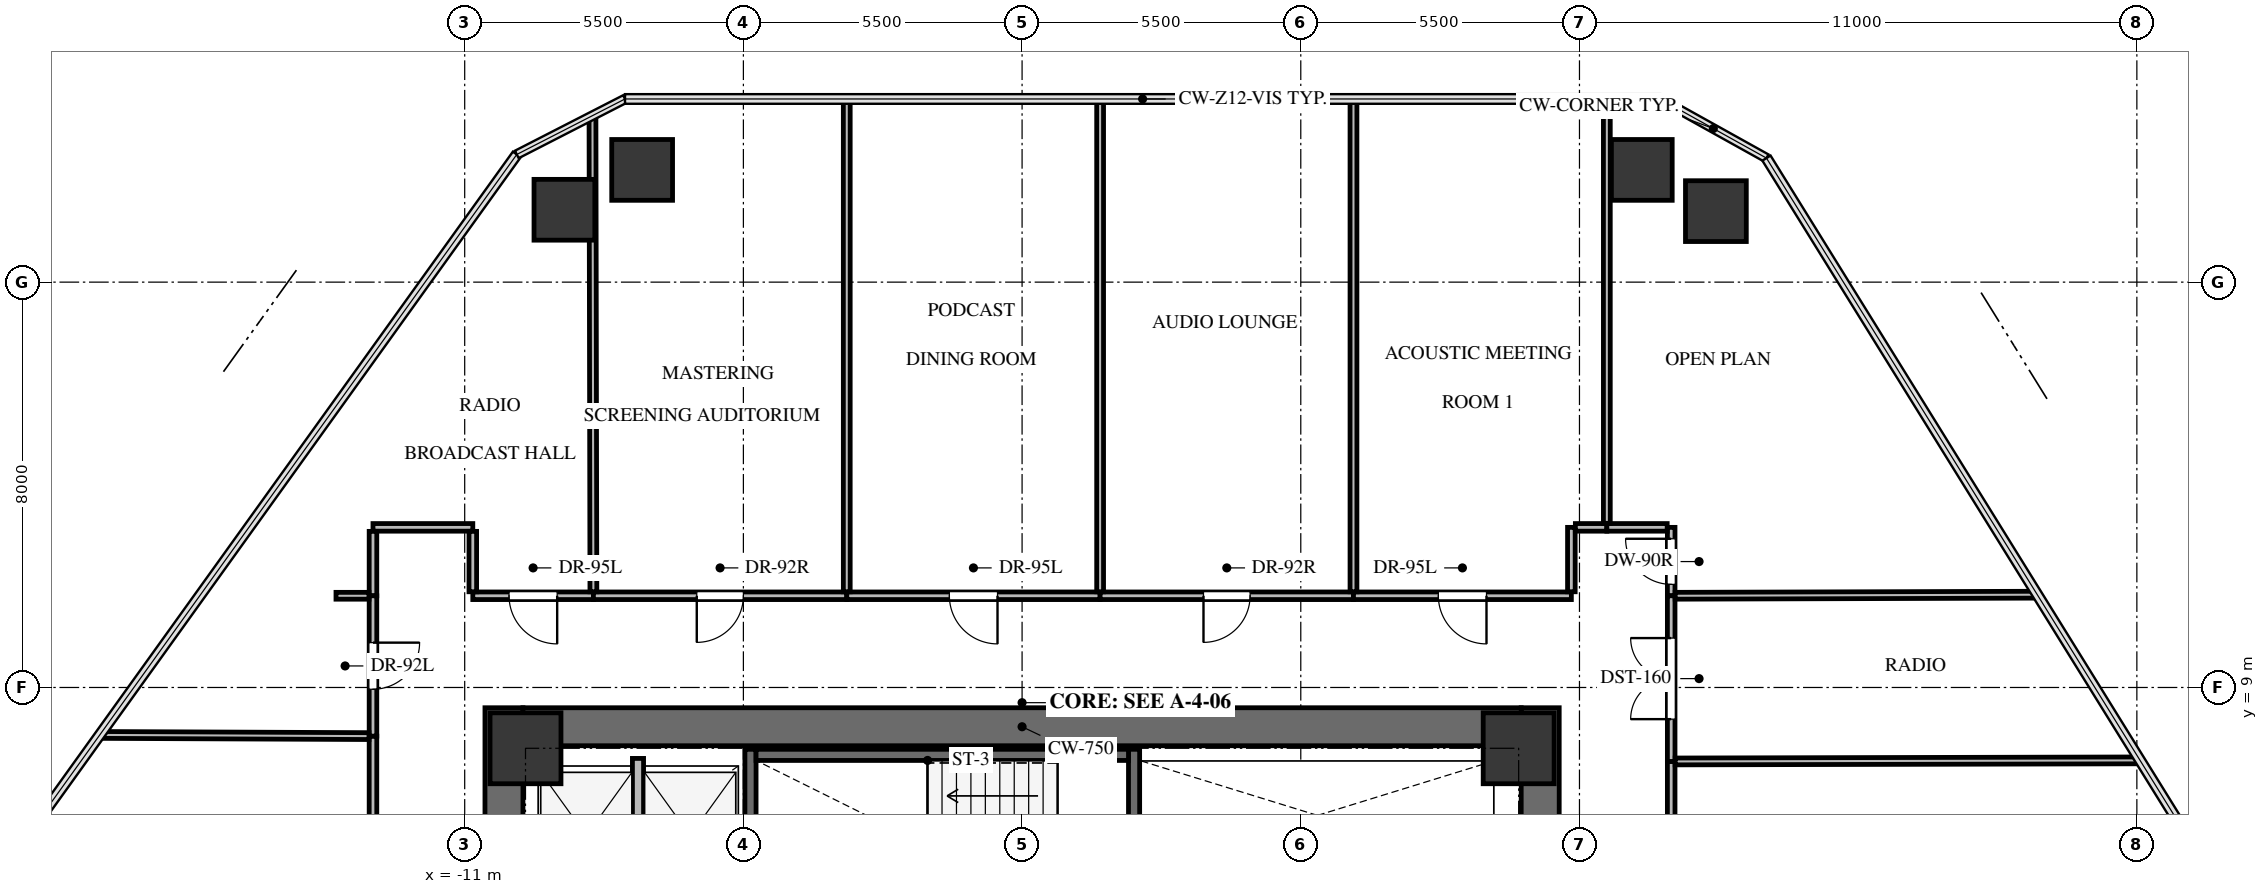
"""IFC4 building model, lengths in metres.
Left out: names, types, materials, properties, quantities, classifications, styles, units other than length and angle.
Written with IfcOpenShell. Run it as: python <this file> out.ifc"""

import sys

from ifc_helpers import new_model, si_unit, direction, frame, frame_2d, origin, origin_2d, place, context, subcontext, project, spatial, rectangle, extrude, source, transform, mapped, element, fill, save


model = new_model("IFC4")
c1 = context("Model", 3, precision=1e-05, world=origin(), true_north=direction((0.0, 1.0)))
c2 = subcontext(c1, "Body", "Model", "MODEL_VIEW")
j1 = project(units=[si_unit("LENGTHUNIT", "METRE"), si_unit("PLANEANGLEUNIT", "RADIAN")], contexts=[c1])
p1 = place(None, origin())
s1 = spatial("IfcSite", under=j1, at=p1, CompositionType="ELEMENT")
p2 = place(p1, origin())
s2 = spatial("IfcBuilding", under=s1, at=p2, CompositionType="ELEMENT")
p3 = place(p2, frame((0.0, 0.0, 130.5)))
s3 = spatial("IfcBuildingStorey", under=s2, at=p3, CompositionType="ELEMENT", Elevation=130.5)
for number, where, z_axis, x_axis in (
    (1, (-10.225, -8.6, 0.0), (0.0, 0.0, 1.0), (0.0, 1.0, 0.0)),
    (2, (10.225, -8.6, 0.0), (0.0, 0.0, 1.0), (0.0, 1.0, 0.0)),
):
    element("IfcWall", number, at=place(p3, frame(where, z_axis=z_axis, x_axis=x_axis)), inside=s3, PredefinedType="SHEAR", context=c2, shape_type="SweptSolid", body=[
        extrude(rectangle(XDim=17.2, YDim=0.75, at=frame_2d((8.6, 0.0))), origin(), (0.0, 0.0, 1.0), 3.3),
    ])
p4 = place(p3, frame((-9.85, 8.225, 0.0), z_axis=(0.0, 0.0, 1.0), x_axis=(1.0, 0.0, 0.0)))
e3 = element("IfcWall", 3, at=p4, inside=s3, PredefinedType="SHEAR", context=c2, shape_type="SweptSolid", body=[
    extrude(rectangle(XDim=19.7, YDim=0.75, at=frame_2d((9.85, 0.0))), origin(), (0.0, 0.0, 1.0), 3.3),
])
for number, where, z_axis, x_axis in (
    (4, (2.21, 4.38, -0.24), (0.0, 0.0, 1.0), (0.0, 1.0, 0.0)),
    (5, (-5.36, 7.78, -0.24), (0.0, 0.0, 1.0), (0.0, -1.0, 0.0)),
):
    element("IfcWall", number, at=place(p3, frame(where, z_axis=z_axis, x_axis=x_axis)), inside=s3, PredefinedType="SHEAR", context=c2, shape_type="SweptSolid", body=[
        extrude(rectangle(XDim=3.4, YDim=0.22, at=frame_2d((1.7, 0.0))), origin(), (0.0, 0.0, 1.0), 3.3),
    ])
p5 = place(p3, frame((2.1, 7.67, -0.24), z_axis=(0.0, 0.0, 1.0), x_axis=(-1.0, 0.0, 0.0)))
e6 = element("IfcWall", 6, at=p5, inside=s3, PredefinedType="SHEAR", context=c2, shape_type="SweptSolid", body=[
    extrude(rectangle(XDim=7.35, YDim=0.22, at=frame_2d((3.675, 0.0))), origin(), (0.0, 0.0, 1.0), 3.3),
])
m1 = source(origin(), c2, "Body", "SweptSolid", [
    extrude(rectangle(XDim=1.4, YDim=1.4, at=origin_2d()), origin(), (0.0, 0.0, 1.0), 3.3),
])
for number, where, z_axis, x_axis in (
    (7, (9.8, 7.8, -0.24), (0.0, 0.0, 1.0), (1.0, 0.0, 0.0)),
    (8, (-9.8, 7.8, -0.24), (0.0, 0.0, 1.0), (1.0, 0.0, 0.0)),
):
    element("IfcColumn", number, at=place(p3, frame(where, z_axis=z_axis, x_axis=x_axis)), inside=s3, PredefinedType="COLUMN", context=c2, shape_type="MappedRepresentation", body=[
        mapped(m1, transform((0.0, 0.0, 0.0), x_axis=(1.0, 0.0, 0.0), y_axis=(0.0, 1.0, 0.0), z_axis=(0.0, 0.0, 1.0), scale=1.0)),
    ])
m2 = source(origin(), c2, "Body", "SweptSolid", [
    extrude(rectangle(XDim=1.2, YDim=1.2, at=origin_2d()), origin(), (0.0, 0.0, 1.0), 3.3),
])
for number, where, z_axis, x_axis in (
    (9, (-9.032, 18.428, -0.24), (0.0, 0.0, 1.0), (1.0, 0.0, 0.0)),
    (10, (-7.498, 19.215, -0.24), (0.0, 0.0, 1.0), (1.0, 0.0, 0.0)),
    (11, (12.23, 19.215, -0.24), (0.0, 0.0, 1.0), (1.0, 0.0, 0.0)),
    (12, (13.692, 18.401, -0.24), (0.0, 0.0, 1.0), (1.0, 0.0, 0.0)),
):
    element("IfcColumn", number, at=place(p3, frame(where, z_axis=z_axis, x_axis=x_axis)), inside=s3, PredefinedType="COLUMN", context=c2, shape_type="MappedRepresentation", body=[
        mapped(m2, transform((0.0, 0.0, 0.0), x_axis=(1.0, 0.0, 0.0), y_axis=(0.0, 1.0, 0.0), z_axis=(0.0, 0.0, 1.0), scale=1.0)),
    ])
p6 = place(p3, frame((-7.58, 4.694, 0.0), z_axis=(0.0, 0.0, 1.0), x_axis=(0.0, 1.0, 0.0)))
e13 = element("IfcWall", 13, at=p6, inside=s3, PredefinedType="SOLIDWALL", context=c2, shape_type="SweptSolid", body=[
    extrude(rectangle(XDim=2.906, YDim=0.22, at=frame_2d((1.453, 0.0))), origin(), (0.0, 0.0, 1.0), 3.045),
])
p7 = place(p3, frame((-8.46, 10.81, 0.0), z_axis=(0.0, 0.0, 1.0), x_axis=(-1.0, 0.0, 0.0)))
e14 = element("IfcWall", 14, at=p7, inside=s3, PredefinedType="PARTITIONING", context=c2, shape_type="SweptSolid", body=[
    extrude(rectangle(XDim=2.38, YDim=0.15, at=frame_2d((1.19, 0.0))), origin(), (0.0, 0.0, 1.0), 3.045),
])
p8 = place(p7, frame((0.715, 0.0, 0.0)))
e15 = element("IfcOpeningElement", 15, at=p8, cuts=e14, PredefinedType="OPENING", context=c2, shape_type="SweptSolid", body=[
    extrude(rectangle(XDim=0.95, YDim=2.1, at=frame_2d((0.475, 1.05))), frame((0.0, 0.085, 0.0), z_axis=(0.0, -1.0, 0.0), x_axis=(1.0, 0.0, 0.0)), (0.0, 0.0, 1.0), 0.17),
])
p9 = place(p3, frame((-10.84, 12.16, 0.0), z_axis=(0.0, 0.0, 1.0), x_axis=(-1.0, 0.0, 0.0)))
e16 = element("IfcWall", 16, at=p9, inside=s3, PredefinedType="PARTITIONING", context=c2, shape_type="SweptSolid", body=[
    extrude(rectangle(XDim=1.97, YDim=0.15, at=frame_2d((0.985, 0.0))), origin(), (0.0, 0.0, 1.0), 3.045),
])
p10 = place(p3, frame((-10.84, 10.889, 0.0), z_axis=(0.0, 0.0, 1.0), x_axis=(0.0, 1.0, 0.0)))
e17 = element("IfcWall", 17, at=p10, inside=s3, PredefinedType="PARTITIONING", context=c2, shape_type="SweptSolid", body=[
    extrude(rectangle(XDim=1.192, YDim=0.15, at=frame_2d((0.596, 0.0))), origin(), (0.0, 0.0, 1.0), 3.045),
])
p11 = place(p3, frame((-12.81, 12.081, 0.0), z_axis=(0.0, 0.0, 1.0), x_axis=(0.0, -1.0, 0.0)))
e18 = element("IfcWall", 18, at=p11, inside=s3, PredefinedType="PARTITIONING", context=c2, shape_type="SweptSolid", body=[
    extrude(rectangle(XDim=1.271, YDim=0.15, at=frame_2d((0.635, 0.0))), origin(), (0.0, 0.0, 1.0), 3.045),
])
p12 = place(p3, frame((-3.46, 10.81, 0.0), z_axis=(0.0, 0.0, 1.0), x_axis=(-1.0, 0.0, 0.0)))
e19 = element("IfcWall", 19, at=p12, inside=s3, PredefinedType="PARTITIONING", context=c2, shape_type="SweptSolid", body=[
    extrude(rectangle(XDim=5.0, YDim=0.15, at=frame_2d((2.5, 0.0))), origin(), (0.0, 0.0, 1.0), 2.212),
])
p13 = place(p12, frame((2.04, 0.0, 0.0)))
e20 = element("IfcOpeningElement", 20, at=p13, cuts=e19, PredefinedType="OPENING", context=c2, shape_type="SweptSolid", body=[
    extrude(rectangle(XDim=0.92, YDim=2.1, at=frame_2d((0.46, 1.05))), frame((0.0, 0.085, 0.0), z_axis=(0.0, -1.0, 0.0), x_axis=(1.0, 0.0, 0.0)), (0.0, 0.0, 1.0), 0.17),
])
p14 = place(p3, frame((1.54, 10.81, 0.0), z_axis=(0.0, 0.0, 1.0), x_axis=(-1.0, 0.0, 0.0)))
e21 = element("IfcWall", 21, at=p14, inside=s3, PredefinedType="PARTITIONING", context=c2, shape_type="SweptSolid", body=[
    extrude(rectangle(XDim=5.0, YDim=0.15, at=frame_2d((2.5, 0.0))), origin(), (0.0, 0.0, 1.0), 3.045),
])
p15 = place(p14, frame((2.025, 0.0, 0.0)))
e22 = element("IfcOpeningElement", 22, at=p15, cuts=e21, PredefinedType="OPENING", context=c2, shape_type="SweptSolid", body=[
    extrude(rectangle(XDim=0.95, YDim=2.1, at=frame_2d((0.475, 1.05))), frame((0.0, 0.085, 0.0), z_axis=(0.0, -1.0, 0.0), x_axis=(1.0, 0.0, 0.0)), (0.0, 0.0, 1.0), 0.17),
])
p16 = place(p3, frame((6.54, 10.81, 0.0), z_axis=(0.0, 0.0, 1.0), x_axis=(-1.0, 0.0, 0.0)))
e23 = element("IfcWall", 23, at=p16, inside=s3, PredefinedType="PARTITIONING", context=c2, shape_type="SweptSolid", body=[
    extrude(rectangle(XDim=5.0, YDim=0.15, at=frame_2d((2.5, 0.0))), origin(), (0.0, 0.0, 1.0), 2.608),
])
p17 = place(p16, frame((2.04, 0.0, 0.0)))
e24 = element("IfcOpeningElement", 24, at=p17, cuts=e23, PredefinedType="OPENING", context=c2, shape_type="SweptSolid", body=[
    extrude(rectangle(XDim=0.92, YDim=2.1, at=frame_2d((0.46, 1.05))), frame((0.0, 0.085, 0.0), z_axis=(0.0, -1.0, 0.0), x_axis=(1.0, 0.0, 0.0)), (0.0, 0.0, 1.0), 0.17),
])
p18 = place(p3, frame((10.84, 10.81, 0.0), z_axis=(0.0, 0.0, 1.0), x_axis=(-1.0, 0.0, 0.0)))
e25 = element("IfcWall", 25, at=p18, inside=s3, PredefinedType="PARTITIONING", context=c2, shape_type="SweptSolid", body=[
    extrude(rectangle(XDim=4.3, YDim=0.15, at=frame_2d((2.15, 0.0))), origin(), (0.0, 0.0, 1.0), 2.212),
])
p19 = place(p18, frame((1.675, 0.0, 0.0)))
e26 = element("IfcOpeningElement", 26, at=p19, cuts=e25, PredefinedType="OPENING", context=c2, shape_type="SweptSolid", body=[
    extrude(rectangle(XDim=0.95, YDim=2.1, at=frame_2d((0.475, 1.05))), frame((0.0, 0.085, 0.0), z_axis=(0.0, -1.0, 0.0), x_axis=(1.0, 0.0, 0.0)), (0.0, 0.0, 1.0), 0.17),
])
p20 = place(p3, frame((10.84, 12.16, 0.0), z_axis=(0.0, 0.0, 1.0), x_axis=(0.0, -1.0, 0.0)))
e27 = element("IfcWall", 27, at=p20, inside=s3, PredefinedType="PARTITIONING", context=c2, shape_type="SweptSolid", body=[
    extrude(rectangle(XDim=1.271, YDim=0.15, at=frame_2d((0.635, 0.0))), origin(), (0.0, 0.0, 1.0), 2.212),
])
p21 = place(p3, frame((11.54, 12.16, 0.0), z_axis=(0.0, 0.0, 1.0), x_axis=(-1.0, 0.0, 0.0)))
e28 = element("IfcWall", 28, at=p21, inside=s3, PredefinedType="PARTITIONING", context=c2, shape_type="SweptSolid", body=[
    extrude(rectangle(XDim=0.621, YDim=0.15, at=frame_2d((0.311, 0.0))), origin(), (0.0, 0.0, 1.0), 2.212),
])
p22 = place(p3, frame((12.81, 10.81, 0.0), z_axis=(0.0, 0.0, 1.0), x_axis=(0.0, 1.0, 0.0)))
e29 = element("IfcWall", 29, at=p22, inside=s3, PredefinedType="PARTITIONING", context=c2, shape_type="SweptSolid", body=[
    extrude(rectangle(XDim=1.35, YDim=0.15, at=frame_2d((0.675, 0.0))), origin(), (0.0, 0.0, 1.0), 3.045),
])
p23 = place(p22, frame((0.225, 0.0, 0.0)))
e30 = element("IfcOpeningElement", 30, at=p23, cuts=e29, PredefinedType="OPENING", context=c2, shape_type="SweptSolid", body=[
    extrude(rectangle(XDim=0.9, YDim=2.05, at=frame_2d((0.45, 1.025))), frame((0.0, 0.085, 0.0), z_axis=(0.0, -1.0, 0.0), x_axis=(1.0, 0.0, 0.0)), (0.0, 0.0, 1.0), 0.17),
])
p24 = place(p3, frame((12.731, 12.16, 0.0), z_axis=(0.0, 0.0, 1.0), x_axis=(-1.0, 0.0, 0.0)))
e31 = element("IfcWall", 31, at=p24, inside=s3, PredefinedType="PARTITIONING", context=c2, shape_type="SweptSolid", body=[
    extrude(rectangle(XDim=1.191, YDim=0.15, at=frame_2d((0.595, 0.0))), origin(), (0.0, 0.0, 1.0), 2.212),
])
p25 = place(p3, frame((-12.81, 8.04, 0.0), z_axis=(0.0, 0.0, 1.0), x_axis=(0.0, -1.0, 0.0)))
e32 = element("IfcWall", 32, at=p25, inside=s3, PredefinedType="PARTITIONING", context=c2, shape_type="SweptSolid", body=[
    extrude(rectangle(XDim=4.5, YDim=0.15, at=frame_2d((2.25, 0.0))), origin(), (0.0, 0.0, 1.0), 3.045),
])
p26 = place(p25, frame((1.775, 0.0, 0.0)))
e33 = element("IfcOpeningElement", 33, at=p26, cuts=e32, PredefinedType="OPENING", context=c2, shape_type="SweptSolid", body=[
    extrude(rectangle(XDim=0.95, YDim=2.1, at=frame_2d((0.475, 1.05))), frame((0.0, 0.085, 0.0), z_axis=(0.0, -1.0, 0.0), x_axis=(1.0, 0.0, 0.0)), (0.0, 0.0, 1.0), 0.17),
])
p27 = place(p3, frame((-12.81, 10.81, 0.0), z_axis=(0.0, 0.0, 1.0), x_axis=(0.0, -1.0, 0.0)))
e34 = element("IfcWall", 34, at=p27, inside=s3, PredefinedType="PARTITIONING", context=c2, shape_type="SweptSolid", body=[
    extrude(rectangle(XDim=2.77, YDim=0.15, at=frame_2d((1.385, 0.0))), origin(), (0.0, 0.0, 1.0), 3.045),
])
p28 = place(p27, frame((0.925, 0.0, 0.0)))
e35 = element("IfcOpeningElement", 35, at=p28, cuts=e34, PredefinedType="OPENING", context=c2, shape_type="SweptSolid", body=[
    extrude(rectangle(XDim=0.92, YDim=2.1, at=frame_2d((0.46, 1.05))), frame((0.0, 0.085, 0.0), z_axis=(0.0, -1.0, 0.0), x_axis=(1.0, 0.0, 0.0)), (0.0, 0.0, 1.0), 0.17),
])
p29 = place(p3, frame((12.81, 3.54, 0.0), z_axis=(0.0, 0.0, 1.0), x_axis=(0.0, 1.0, 0.0)))
e36 = element("IfcWall", 36, at=p29, inside=s3, PredefinedType="PARTITIONING", context=c2, shape_type="SweptSolid", body=[
    extrude(rectangle(XDim=4.0, YDim=0.15, at=frame_2d((2.0, 0.0))), origin(), (0.0, 0.0, 1.0), 3.045),
])
p30 = place(p29, frame((1.55, 0.0, 0.0)))
e37 = element("IfcOpeningElement", 37, at=p30, cuts=e36, PredefinedType="OPENING", context=c2, shape_type="SweptSolid", body=[
    extrude(rectangle(XDim=0.9, YDim=2.05, at=frame_2d((0.45, 1.025))), frame((0.0, 0.085, 0.0), z_axis=(0.0, -1.0, 0.0), x_axis=(1.0, 0.0, 0.0)), (0.0, 0.0, 1.0), 0.17),
])
p31 = place(p3, frame((12.81, 7.54, 0.0), z_axis=(0.0, 0.0, 1.0), x_axis=(0.0, 1.0, 0.0)))
e38 = element("IfcWall", 38, at=p31, inside=s3, PredefinedType="PARTITIONING", context=c2, shape_type="SweptSolid", body=[
    extrude(rectangle(XDim=3.27, YDim=0.15, at=frame_2d((1.635, 0.0))), origin(), (0.0, 0.0, 1.0), 3.045),
])
p32 = place(p31, frame((0.835, 0.0, 0.0)))
e39 = element("IfcOpeningElement", 39, at=p32, cuts=e38, PredefinedType="OPENING", context=c2, shape_type="SweptSolid", body=[
    extrude(rectangle(XDim=1.6, YDim=2.15, at=frame_2d((0.8, 1.075))), frame((0.0, 0.085, 0.0), z_axis=(0.0, -1.0, 0.0), x_axis=(1.0, 0.0, 0.0)), (0.0, 0.0, 1.0), 0.17),
])
p33 = place(p3, frame((-8.478, 20.286, 0.0), z_axis=(0.0, 0.0, 1.0), x_axis=(0.001922623691, -0.999998151757, 0.0)))
e40 = element("IfcWall", 40, at=p33, inside=s3, PredefinedType="PARTITIONING", context=c2, shape_type="SweptSolid", body=[
    extrude(rectangle(XDim=9.397, YDim=0.135, at=frame_2d((4.698, 0.0))), origin(), (0.0, 0.0, 1.0), 2.212),
])
p34 = place(p3, frame((-12.889, 10.81, 0.0), z_axis=(0.0, 0.0, 1.0), x_axis=(-1.0, 0.0, 0.0)))
e41 = element("IfcWall", 41, at=p34, inside=s3, PredefinedType="PARTITIONING", context=c2, shape_type="SweptSolid", body=[
    extrude(rectangle(XDim=0.651, YDim=0.135, at=frame_2d((0.326, 0.0))), origin(), (0.0, 0.0, 1.0), 3.045),
])
for number, where, z_axis, x_axis in (
    (42, (-3.46, 20.615, 0.0), (0.0, 0.0, 1.0), (0.0, -1.0, 0.0)),
    (43, (1.54, 20.615, 0.0), (0.0, 0.0, 1.0), (0.0, -1.0, 0.0)),
    (44, (6.54, 20.615, 0.0), (0.0, 0.0, 1.0), (0.0, -1.0, 0.0)),
):
    element("IfcWall", number, at=place(p3, frame(where, z_axis=z_axis, x_axis=x_axis)), inside=s3, PredefinedType="PARTITIONING", context=c2, shape_type="SweptSolid", body=[
        extrude(rectangle(XDim=9.726, YDim=0.135, at=frame_2d((4.863, 0.0))), origin(), (0.0, 0.0, 1.0), 2.38),
    ])
p35 = place(p3, frame((11.54, 20.615, 0.0), z_axis=(0.0, 0.0, 1.0), x_axis=(0.0, -1.0, 0.0)))
e45 = element("IfcWall", 45, at=p35, inside=s3, PredefinedType="PARTITIONING", context=c2, shape_type="SweptSolid", body=[
    extrude(rectangle(XDim=8.376, YDim=0.135, at=frame_2d((4.188, 0.0))), origin(), (0.0, 0.0, 1.0), 2.212),
])
p36 = place(p3, frame((20.035, 10.831, 0.0), z_axis=(0.0, 0.0, 1.0), x_axis=(-0.999995783715, -0.002903885812, 0.0)))
e46 = element("IfcWall", 46, at=p36, inside=s3, PredefinedType="PARTITIONING", context=c2, shape_type="SweptSolid", body=[
    extrude(rectangle(XDim=7.146, YDim=0.135, at=frame_2d((3.573, 0.0))), origin(), (0.0, 0.0, 1.0), 2.38),
])
p37 = place(p3, frame((-18.202, 8.063, 0.0), z_axis=(0.0, 0.0, 1.0), x_axis=(0.999990671281, -0.004319415637, 0.0)))
e47 = element("IfcWall", 47, at=p37, inside=s3, PredefinedType="PARTITIONING", context=c2, shape_type="SweptSolid", body=[
    extrude(rectangle(XDim=5.313, YDim=0.135, at=frame_2d((2.656, 0.0))), origin(), (0.0, 0.0, 1.0), 2.38),
])
p38 = place(p3, frame((12.889, 7.54, 0.0), z_axis=(0.0, 0.0, 1.0), x_axis=(0.99999744191, 0.002261895808, 0.0)))
e48 = element("IfcWall", 48, at=p38, inside=s3, PredefinedType="PARTITIONING", context=c2, shape_type="SweptSolid", body=[
    extrude(rectangle(XDim=9.175, YDim=0.135, at=frame_2d((4.587, 0.0))), origin(), (0.0, 0.0, 1.0), 2.38),
])
m3 = source(origin(), c2, "Body", "SweptSolid", [
    extrude(rectangle(XDim=0.95, YDim=2.1, at=frame_2d((0.475, 1.05))), frame((0.0, 0.025, 0.0), z_axis=(0.0, -1.0, 0.0), x_axis=(1.0, 0.0, 0.0)), (0.0, 0.0, 1.0), 0.05),
])
p39 = place(p8, origin())
e49 = element("IfcDoor", 49, at=p39, inside=s3, OperationType="SINGLE_SWING_LEFT", PredefinedType="DOOR", context=c2, shape_type="MappedRepresentation", body=[
    mapped(m3, transform((0.0, 0.0, 0.0), x_axis=(1.0, 0.0, 0.0), y_axis=(0.0, 1.0, 0.0), z_axis=(0.0, 0.0, 1.0), scale=1.0)),
])
fill(e15, e49)
m4 = source(origin(), c2, "Body", "SweptSolid", [
    extrude(rectangle(XDim=0.92, YDim=2.1, at=frame_2d((0.46, 1.05))), frame((0.0, 0.025, 0.0), z_axis=(0.0, -1.0, 0.0), x_axis=(1.0, 0.0, 0.0)), (0.0, 0.0, 1.0), 0.05),
])
p40 = place(p13, origin())
e50 = element("IfcDoor", 50, at=p40, inside=s3, OperationType="SINGLE_SWING_RIGHT", PredefinedType="DOOR", context=c2, shape_type="MappedRepresentation", body=[
    mapped(m4, transform((0.0, 0.0, 0.0), x_axis=(1.0, 0.0, 0.0), y_axis=(0.0, 1.0, 0.0), z_axis=(0.0, 0.0, 1.0), scale=1.0)),
])
fill(e20, e50)
p41 = place(p15, origin())
e51 = element("IfcDoor", 51, at=p41, inside=s3, OperationType="SINGLE_SWING_LEFT", PredefinedType="DOOR", context=c2, shape_type="MappedRepresentation", body=[
    mapped(m3, transform((0.0, 0.0, 0.0), x_axis=(1.0, 0.0, 0.0), y_axis=(0.0, 1.0, 0.0), z_axis=(0.0, 0.0, 1.0), scale=1.0)),
])
fill(e22, e51)
p42 = place(p17, origin())
e52 = element("IfcDoor", 52, at=p42, inside=s3, OperationType="SINGLE_SWING_RIGHT", PredefinedType="DOOR", context=c2, shape_type="MappedRepresentation", body=[
    mapped(m4, transform((0.0, 0.0, 0.0), x_axis=(1.0, 0.0, 0.0), y_axis=(0.0, 1.0, 0.0), z_axis=(0.0, 0.0, 1.0), scale=1.0)),
])
fill(e24, e52)
p43 = place(p19, origin())
e53 = element("IfcDoor", 53, at=p43, inside=s3, OperationType="SINGLE_SWING_LEFT", PredefinedType="DOOR", context=c2, shape_type="MappedRepresentation", body=[
    mapped(m3, transform((0.0, 0.0, 0.0), x_axis=(1.0, 0.0, 0.0), y_axis=(0.0, 1.0, 0.0), z_axis=(0.0, 0.0, 1.0), scale=1.0)),
])
fill(e26, e53)
m5 = source(origin(), c2, "Body", "SweptSolid", [
    extrude(rectangle(XDim=0.9, YDim=2.05, at=frame_2d((0.45, 1.025))), frame((0.0, 0.025, 0.0), z_axis=(0.0, -1.0, 0.0), x_axis=(1.0, 0.0, 0.0)), (0.0, 0.0, 1.0), 0.05),
])
p44 = place(p23, origin())
e54 = element("IfcDoor", 54, at=p44, inside=s3, OperationType="SINGLE_SWING_RIGHT", PredefinedType="DOOR", context=c2, shape_type="MappedRepresentation", body=[
    mapped(m5, transform((0.0, 0.0, 0.0), x_axis=(1.0, 0.0, 0.0), y_axis=(0.0, 1.0, 0.0), z_axis=(0.0, 0.0, 1.0), scale=1.0)),
])
fill(e30, e54)
m6 = source(origin(), c2, "Body", "SweptSolid", [
    extrude(rectangle(XDim=0.92, YDim=2.1, at=frame_2d((0.46, 1.05))), frame((0.0, 0.025, 0.0), z_axis=(0.0, -1.0, 0.0), x_axis=(1.0, 0.0, 0.0)), (0.0, 0.0, 1.0), 0.05),
])
p45 = place(p28, origin())
e55 = element("IfcDoor", 55, at=p45, inside=s3, OperationType="SINGLE_SWING_LEFT", PredefinedType="DOOR", context=c2, shape_type="MappedRepresentation", body=[
    mapped(m6, transform((0.0, 0.0, 0.0), x_axis=(1.0, 0.0, 0.0), y_axis=(0.0, 1.0, 0.0), z_axis=(0.0, 0.0, 1.0), scale=1.0)),
])
fill(e35, e55)
m7 = source(origin(), c2, "Body", "SweptSolid", [
    extrude(rectangle(XDim=1.6, YDim=2.15, at=frame_2d((0.8, 1.075))), frame((0.0, 0.025, 0.0), z_axis=(0.0, -1.0, 0.0), x_axis=(1.0, 0.0, 0.0)), (0.0, 0.0, 1.0), 0.05),
])
p46 = place(p32, origin())
e56 = element("IfcDoor", 56, at=p46, inside=s3, OperationType="DOUBLE_DOOR_SINGLE_SWING", PredefinedType="DOOR", context=c2, shape_type="MappedRepresentation", body=[
    mapped(m7, transform((0.0, 0.0, 0.0), x_axis=(1.0, 0.0, 0.0), y_axis=(0.0, 1.0, 0.0), z_axis=(0.0, 0.0, 1.0), scale=1.0)),
])
fill(e39, e56)
save(model, sys.argv[1])
